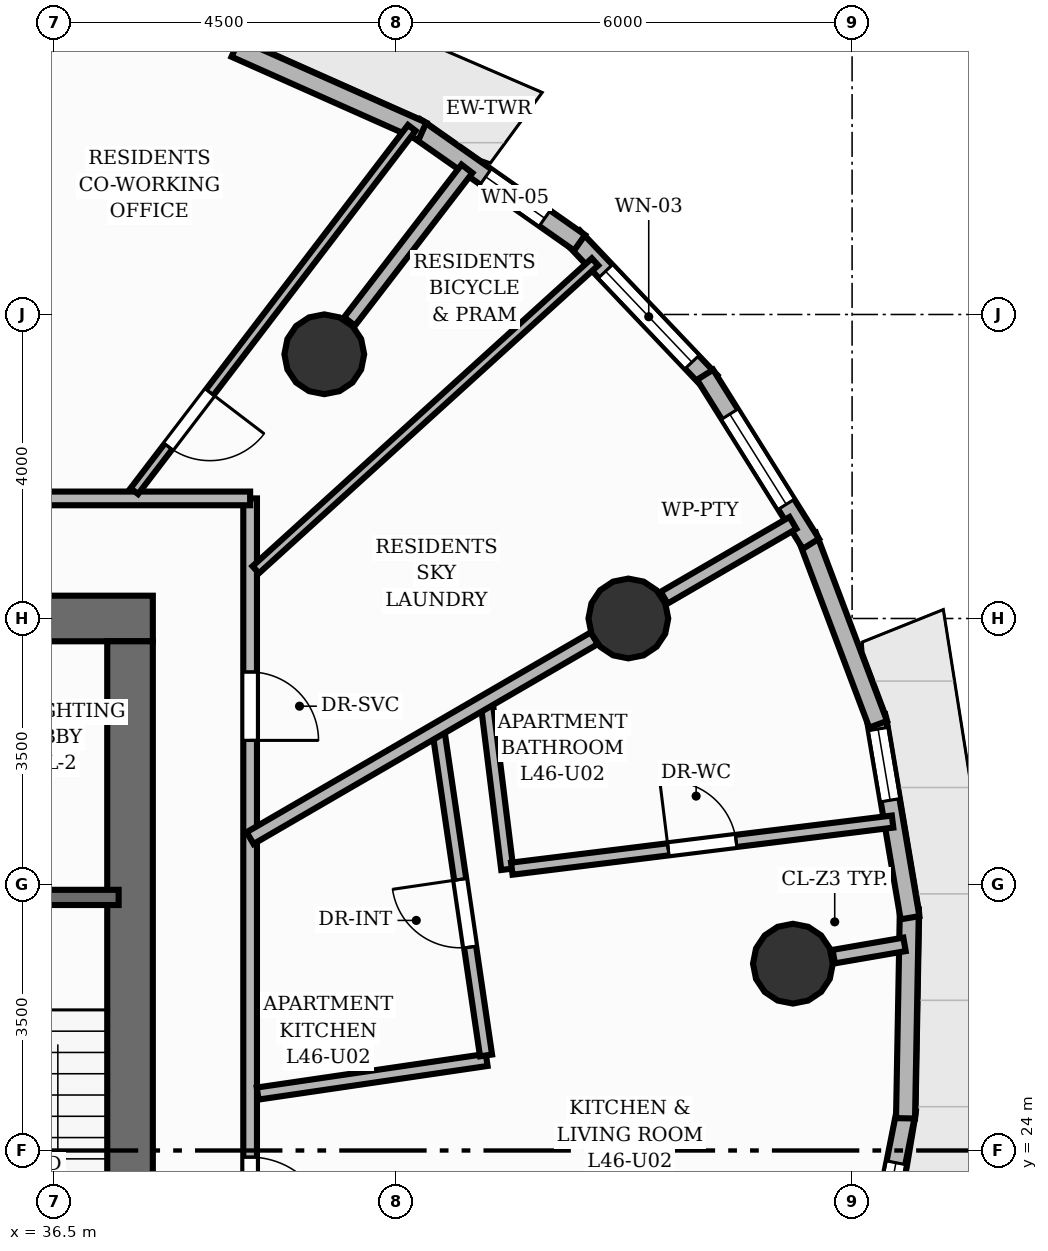
"""IFC4 building model, lengths in metres.
Left out: names, types, materials, properties, quantities, classifications, styles, units other than length and angle.
Written with IfcOpenShell. Run it as: python <this file> out.ifc"""

import sys

from ifc_helpers import new_model, si_unit, direction, frame, frame_2d, origin, origin_2d, place, context, subcontext, project, spatial, rectangle, circle, extrude, element, fill, save


model = new_model("IFC4")
c1 = context("Model", 3, precision=1e-05, world=origin(), true_north=direction((0.0, 1.0)))
c2 = subcontext(c1, "Body", "Model", "MODEL_VIEW")
j1 = project(units=[si_unit("LENGTHUNIT", "METRE"), si_unit("PLANEANGLEUNIT", "RADIAN")], contexts=[c1])
p1 = place(None, origin())
s1 = spatial("IfcSite", under=j1, at=p1, CompositionType="ELEMENT")
p2 = place(p1, origin())
s2 = spatial("IfcBuilding", under=s1, at=p2, CompositionType="ELEMENT")
p3 = place(p2, frame((0.0, 0.0, 155.36)))
s3 = spatial("IfcBuildingStorey", under=s2, at=p3, CompositionType="ELEMENT", Elevation=155.36)
p4 = place(p3, frame((22.7, 31.0, 0.0), z_axis=(0.0, 0.0, 1.0), x_axis=(1.0, 0.0, 0.0)))
e1 = element("IfcWall", 1, at=p4, inside=s3, PredefinedType="SHEAR", context=c2, shape_type="SweptSolid", body=[
    extrude(rectangle(XDim=15.1, YDim=0.6, at=frame_2d((7.55, 0.0))), origin(), (0.0, 0.0, 1.0), 3.2),
])
p5 = place(p4, frame((11.7, 0.0, 0.0)))
e2 = element("IfcOpeningElement", 2, at=p5, cuts=e1, PredefinedType="OPENING", context=c2, shape_type="SweptSolid", body=[
    extrude(rectangle(XDim=1.1, YDim=2.15, at=frame_2d((0.55, 1.075))), frame((0.0, 0.31, 0.0), z_axis=(0.0, -1.0, 0.0), x_axis=(1.0, 0.0, 0.0)), (0.0, 0.0, 1.0), 0.62),
])
p6 = place(p3, frame((37.5, 17.3, 0.0), z_axis=(0.0, 0.0, 1.0), x_axis=(0.0, 1.0, 0.0)))
e3 = element("IfcWall", 3, at=p6, inside=s3, PredefinedType="SHEAR", context=c2, shape_type="SweptSolid", body=[
    extrude(rectangle(XDim=13.4, YDim=0.6, at=frame_2d((6.7, 0.0))), origin(), (0.0, 0.0, 1.0), 3.2),
])
for number, where, z_axis, x_axis in (
    (4, (46.221, 26.458, 0.0), (0.0, 0.0, 1.0), (1.0, 0.0, 0.0)),
    (5, (44.056, 31.0, 0.0), (0.0, 0.0, 1.0), (1.0, 0.0, 0.0)),
    (6, (40.056, 34.477, 0.0), (0.0, 0.0, 1.0), (1.0, 0.0, 0.0)),
):
    element("IfcColumn", number, at=place(p3, frame(where, z_axis=z_axis, x_axis=x_axis)), inside=s3, PredefinedType="COLUMN", context=c2, shape_type="SweptSolid", body=[
        extrude(circle(Radius=0.525, at=origin_2d()), origin(), (0.0, 0.0, 1.0), 3.2),
    ])
p7 = place(p3, frame((43.328, 36.019, 0.0), z_axis=(0.0, 0.0, 1.0), x_axis=(0.688923042016, -0.724834492957, 0.0)))
e7 = element("IfcWall", 7, at=p7, inside=s3, PredefinedType="SOLIDWALL", context=c2, shape_type="SweptSolid", body=[
    extrude(rectangle(XDim=2.624, YDim=0.25, at=frame_2d((1.312, 0.0))), origin(), (0.0, 0.0, 1.0), 2.8),
])
p8 = place(p7, frame((0.621, 0.0, 0.85)))
e8 = element("IfcOpeningElement", 8, at=p8, cuts=e7, PredefinedType="OPENING", context=c2, shape_type="SweptSolid", body=[
    extrude(rectangle(XDim=1.65, YDim=1.55, at=frame_2d((0.825, 0.775))), frame((0.0, 0.135, 0.0), z_axis=(0.0, -1.0, 0.0), x_axis=(1.0, 0.0, 0.0)), (0.0, 0.0, 1.0), 0.27),
])
p9 = place(p3, frame((41.247, 37.466, 0.0), z_axis=(0.0, 0.0, 1.0), x_axis=(0.818434239786, -0.574600204617, 0.0)))
e9 = element("IfcWall", 9, at=p9, inside=s3, PredefinedType="SOLIDWALL", context=c2, shape_type="SweptSolid", body=[
    extrude(rectangle(XDim=2.648, YDim=0.25, at=frame_2d((1.324, 0.0))), origin(), (0.0, 0.0, 1.0), 2.8),
])
p10 = place(p9, frame((1.138, 0.0, 0.85)))
e10 = element("IfcOpeningElement", 10, at=p10, cuts=e9, PredefinedType="OPENING", context=c2, shape_type="SweptSolid", body=[
    extrude(rectangle(XDim=0.95, YDim=1.29, at=frame_2d((0.475, 0.645))), frame((0.0, 0.135, 0.0), z_axis=(0.0, -1.0, 0.0), x_axis=(1.0, 0.0, 0.0)), (0.0, 0.0, 1.0), 0.27),
])
p11 = place(p3, frame((38.886, 38.505, 0.0), z_axis=(0.0, 0.0, 1.0), x_axis=(0.913598321014, -0.406617889228, 0.0)))
e11 = element("IfcWall", 11, at=p11, inside=s3, PredefinedType="SOLIDWALL", context=c2, shape_type="SweptSolid", body=[
    extrude(rectangle(XDim=2.693, YDim=0.25, at=frame_2d((1.346, 0.0))), origin(), (0.0, 0.0, 1.0), 2.8),
])
p12 = place(p3, frame((47.715, 24.534, 0.0), z_axis=(0.0, 0.0, 1.0), x_axis=(-0.194099406303, -0.980981865517, 0.0)))
e12 = element("IfcWall", 12, at=p12, inside=s3, PredefinedType="SOLIDWALL", context=c2, shape_type="SweptSolid", body=[
    extrude(rectangle(XDim=2.817, YDim=0.25, at=frame_2d((1.409, 0.0))), origin(), (0.0, 0.0, 1.0), 2.8),
])
p13 = place(p12, frame((0.709, 0.0, 0.85)))
e13 = element("IfcOpeningElement", 13, at=p13, cuts=e12, PredefinedType="OPENING", context=c2, shape_type="SweptSolid", body=[
    extrude(rectangle(XDim=1.4, YDim=1.55, at=frame_2d((0.7, 0.775))), frame((0.0, 0.135, 0.0), z_axis=(0.0, -1.0, 0.0), x_axis=(1.0, 0.0, 0.0)), (0.0, 0.0, 1.0), 0.27),
])
p14 = place(p3, frame((47.753, 27.175, 0.0), z_axis=(0.0, 0.0, 1.0), x_axis=(-0.018273942119, -0.999833017578, 0.0)))
e14 = element("IfcWall", 14, at=p14, inside=s3, PredefinedType="SOLIDWALL", context=c2, shape_type="SweptSolid", body=[
    extrude(rectangle(XDim=2.752, YDim=0.25, at=frame_2d((1.376, 0.0))), origin(), (0.0, 0.0, 1.0), 2.8),
])
p15 = place(p3, frame((47.313, 29.718, 0.0), z_axis=(0.0, 0.0, 1.0), x_axis=(0.166721354457, -0.9860040517, 0.0)))
e15 = element("IfcWall", 15, at=p15, inside=s3, PredefinedType="SOLIDWALL", context=c2, shape_type="SweptSolid", body=[
    extrude(rectangle(XDim=2.693, YDim=0.25, at=frame_2d((1.346, 0.0))), origin(), (0.0, 0.0, 1.0), 2.8),
])
p16 = place(p15, frame((0.175, 0.0, 0.85)))
e16 = element("IfcOpeningElement", 16, at=p16, cuts=e15, PredefinedType="OPENING", context=c2, shape_type="SweptSolid", body=[
    extrude(rectangle(XDim=0.95, YDim=1.45, at=frame_2d((0.475, 0.725))), frame((0.0, 0.135, 0.0), z_axis=(0.0, -1.0, 0.0), x_axis=(1.0, 0.0, 0.0)), (0.0, 0.0, 1.0), 0.27),
])
p17 = place(p3, frame((46.408, 32.086, 0.0), z_axis=(0.0, 0.0, 1.0), x_axis=(0.353022229402, -0.93561493444, 0.0)))
e17 = element("IfcWall", 17, at=p17, inside=s3, PredefinedType="SOLIDWALL", context=c2, shape_type="SweptSolid", body=[
    extrude(rectangle(XDim=2.648, YDim=0.25, at=frame_2d((1.324, 0.0))), origin(), (0.0, 0.0, 1.0), 2.8),
])
p18 = place(p3, frame((45.066, 34.207, 0.0), z_axis=(0.0, 0.0, 1.0), x_axis=(0.530726374543, -0.847543223302, 0.0)))
e18 = element("IfcWall", 18, at=p18, inside=s3, PredefinedType="SOLIDWALL", context=c2, shape_type="SweptSolid", body=[
    extrude(rectangle(XDim=2.624, YDim=0.25, at=frame_2d((1.312, 0.0))), origin(), (0.0, 0.0, 1.0), 2.8),
])
p19 = place(p18, frame((0.612, 0.0, 0.85)))
e19 = element("IfcOpeningElement", 19, at=p19, cuts=e18, PredefinedType="OPENING", context=c2, shape_type="SweptSolid", body=[
    extrude(rectangle(XDim=1.4, YDim=1.29, at=frame_2d((0.7, 0.645))), frame((0.0, 0.135, 0.0), z_axis=(0.0, -1.0, 0.0), x_axis=(1.0, 0.0, 0.0)), (0.0, 0.0, 1.0), 0.27),
])
p20 = place(p3, frame((34.11, 27.33, 0.0), z_axis=(0.0, 0.0, 1.0), x_axis=(1.0, 0.0, 0.0)))
e20 = element("IfcWall", 20, at=p20, inside=s3, PredefinedType="SHEAR", context=c2, shape_type="SweptSolid", body=[
    extrude(rectangle(XDim=3.24, YDim=0.2, at=frame_2d((1.62, 0.0))), origin(), (0.0, 0.0, 1.0), 3.2),
])
p21 = place(p20, frame((1.135, 0.0, 0.0)))
e21 = element("IfcOpeningElement", 21, at=p21, cuts=e20, PredefinedType="OPENING", context=c2, shape_type="SweptSolid", body=[
    extrude(rectangle(XDim=1.05, YDim=2.15, at=frame_2d((0.525, 1.075))), frame((0.0, 0.11, 0.0), z_axis=(0.0, -1.0, 0.0), x_axis=(1.0, 0.0, 0.0)), (0.0, 0.0, 1.0), 0.22),
])
p22 = place(p3, frame((46.758, 26.551, 0.0), z_axis=(0.0, 0.0, 1.0), x_axis=(0.985363023372, 0.170469094476, 0.0)))
e22 = element("IfcWall", 22, at=p22, inside=s3, PredefinedType="PARTITIONING", context=c2, shape_type="SweptSolid", body=[
    extrude(rectangle(XDim=0.945, YDim=0.18, at=frame_2d((0.473, 0.0))), origin(), (0.0, 0.0, 1.0), 2.176),
])
p23 = place(p3, frame((44.528, 31.274, 0.0), z_axis=(0.0, 0.0, 1.0), x_axis=(0.864794183852, 0.502126497584, 0.0)))
e23 = element("IfcWall", 23, at=p23, inside=s3, PredefinedType="PARTITIONING", context=c2, shape_type="SweptSolid", body=[
    extrude(rectangle(XDim=1.959, YDim=0.18, at=frame_2d((0.979, 0.0))), origin(), (0.0, 0.0, 1.0), 2.176),
])
p24 = place(p3, frame((40.388, 34.908, 0.0), z_axis=(0.0, 0.0, 1.0), x_axis=(0.609529171404, 0.79276364019, 0.0)))
e24 = element("IfcWall", 24, at=p24, inside=s3, PredefinedType="PARTITIONING", context=c2, shape_type="SweptSolid", body=[
    extrude(rectangle(XDim=2.534, YDim=0.18, at=frame_2d((1.267, 0.0))), origin(), (0.0, 0.0, 1.0), 2.176),
])
p25 = place(p3, frame((39.08, 32.58, 0.0), z_axis=(0.0, 0.0, 1.0), x_axis=(0.0, -1.0, 0.0)))
e25 = element("IfcWall", 25, at=p25, inside=s3, PredefinedType="PARTITIONING", context=c2, shape_type="SweptSolid", body=[
    extrude(rectangle(XDim=17.16, YDim=0.18, at=frame_2d((8.58, 0.0))), origin(), (0.0, 0.0, 1.0), 2.795),
])
p26 = place(p25, frame((8.667, 0.0, 0.0)))
e26 = element("IfcOpeningElement", 26, at=p26, cuts=e25, PredefinedType="OPENING", context=c2, shape_type="SweptSolid", body=[
    extrude(rectangle(XDim=1.05, YDim=2.15, at=frame_2d((0.525, 1.075))), frame((0.0, 0.1, 0.0), z_axis=(0.0, -1.0, 0.0), x_axis=(1.0, 0.0, 0.0)), (0.0, 0.0, 1.0), 0.2),
])
p27 = place(p25, frame((2.284, 0.0, 0.0)))
e27 = element("IfcOpeningElement", 27, at=p27, cuts=e25, PredefinedType="OPENING", context=c2, shape_type="SweptSolid", body=[
    extrude(rectangle(XDim=0.9, YDim=2.1, at=frame_2d((0.45, 1.05))), frame((0.0, 0.1, 0.0), z_axis=(0.0, -1.0, 0.0), x_axis=(1.0, 0.0, 0.0)), (0.0, 0.0, 1.0), 0.2),
])
p28 = place(p3, frame((29.544, 32.58, 0.0), z_axis=(0.0, 0.0, 1.0), x_axis=(1.0, 0.0, 0.0)))
e28 = element("IfcWall", 28, at=p28, inside=s3, PredefinedType="PARTITIONING", context=c2, shape_type="SweptSolid", body=[
    extrude(rectangle(XDim=9.536, YDim=0.18, at=frame_2d((4.768, 0.0))), origin(), (0.0, 0.0, 1.0), 2.795),
])
p29 = place(p28, frame((5.733, 0.0, 0.0)))
e29 = element("IfcOpeningElement", 29, at=p29, cuts=e28, PredefinedType="OPENING", context=c2, shape_type="SweptSolid", body=[
    extrude(rectangle(XDim=0.9, YDim=2.1, at=frame_2d((0.45, 1.05))), frame((0.0, 0.1, 0.0), z_axis=(0.0, -1.0, 0.0), x_axis=(1.0, 0.0, 0.0)), (0.0, 0.0, 1.0), 0.2),
])
p30 = place(p3, frame((42.189, 29.916, 0.0), z_axis=(0.0, 0.0, 1.0), x_axis=(0.122809822633, -0.99243022297, 0.0)))
e30 = element("IfcWall", 30, at=p30, inside=s3, PredefinedType="PLUMBINGWALL", context=c2, shape_type="SweptSolid", body=[
    extrude(rectangle(XDim=2.232, YDim=0.16, at=frame_2d((1.116, 0.0))), origin(), (0.0, 0.0, 1.0), 2.795),
])
p31 = place(p3, frame((42.523, 27.708, 0.0), z_axis=(0.0, 0.0, 1.0), x_axis=(0.992432598709, 0.122790622685, 0.0)))
e31 = element("IfcWall", 31, at=p31, inside=s3, PredefinedType="PLUMBINGWALL", context=c2, shape_type="SweptSolid", body=[
    extrude(rectangle(XDim=5.048, YDim=0.16, at=frame_2d((2.524, 0.0))), origin(), (0.0, 0.0, 1.0), 2.532),
])
p32 = place(p31, frame((2.074, 0.0, 0.0)))
e32 = element("IfcOpeningElement", 32, at=p32, cuts=e31, PredefinedType="OPENING", context=c2, shape_type="SweptSolid", body=[
    extrude(rectangle(XDim=0.9, YDim=2.1, at=frame_2d((0.45, 1.05))), frame((0.0, 0.09, 0.0), z_axis=(0.0, -1.0, 0.0), x_axis=(1.0, 0.0, 0.0)), (0.0, 0.0, 1.0), 0.18),
])
p33 = place(p3, frame((39.179, 24.749, 0.0), z_axis=(0.0, 0.0, 1.0), x_axis=(0.989395416792, 0.145247062726, 0.0)))
e33 = element("IfcWall", 33, at=p33, inside=s3, PredefinedType="PLUMBINGWALL", context=c2, shape_type="SweptSolid", body=[
    extrude(rectangle(XDim=3.046, YDim=0.16, at=frame_2d((1.523, 0.0))), origin(), (0.0, 0.0, 1.0), 2.795),
])
p34 = place(p3, frame((42.184, 25.251, 0.0), z_axis=(0.0, 0.0, 1.0), x_axis=(-0.145293261483, 0.989388633535, 0.0)))
e34 = element("IfcWall", 34, at=p34, inside=s3, PredefinedType="PLUMBINGWALL", context=c2, shape_type="SweptSolid", body=[
    extrude(rectangle(XDim=4.342, YDim=0.16, at=frame_2d((2.171, 0.0))), origin(), (0.0, 0.0, 1.0), 2.795),
])
p35 = place(p34, frame((1.441, 0.0, 0.0)))
e35 = element("IfcOpeningElement", 35, at=p35, cuts=e34, PredefinedType="OPENING", context=c2, shape_type="SweptSolid", body=[
    extrude(rectangle(XDim=0.9, YDim=2.1, at=frame_2d((0.45, 1.05))), frame((0.0, 0.09, 0.0), z_axis=(0.0, -1.0, 0.0), x_axis=(1.0, 0.0, 0.0)), (0.0, 0.0, 1.0), 0.18),
])
p36 = place(p3, frame((39.08, 28.111, 0.0), z_axis=(0.0, 0.0, 1.0), x_axis=(0.864768049288, 0.502171505495, 0.0)))
e36 = element("IfcWall", 36, at=p36, inside=s3, PredefinedType="PARTITIONING", context=c2, shape_type="SweptSolid", body=[
    extrude(rectangle(XDim=5.237, YDim=0.18, at=frame_2d((2.619, 0.0))), origin(), (0.0, 0.0, 1.0), 2.176),
])
p37 = place(p3, frame((41.207, 37.455, 0.0), z_axis=(0.0, 0.0, 1.0), x_axis=(-0.606958821331, -0.794733281805, 0.0)))
e37 = element("IfcWall", 37, at=p37, inside=s3, PredefinedType="PARTITIONING", context=c2, shape_type="SweptSolid", body=[
    extrude(rectangle(XDim=6.015, YDim=0.125, at=frame_2d((3.007, 0.0))), origin(), (0.0, 0.0, 1.0), 2.795),
])
p38 = place(p37, frame((4.377, 0.0, 0.0)))
e38 = element("IfcOpeningElement", 38, at=p38, cuts=e37, PredefinedType="OPENING", context=c2, shape_type="SweptSolid", body=[
    extrude(rectangle(XDim=0.9, YDim=2.1, at=frame_2d((0.45, 1.05))), frame((0.0, 0.073, 0.0), z_axis=(0.0, -1.0, 0.0), x_axis=(1.0, 0.0, 0.0)), (0.0, 0.0, 1.0), 0.145),
])
p39 = place(p3, frame((39.154, 31.641, 0.0), z_axis=(0.0, 0.0, 1.0), x_axis=(0.740463996849, 0.672096026896, 0.0)))
e39 = element("IfcWall", 39, at=p39, inside=s3, PredefinedType="PARTITIONING", context=c2, shape_type="SweptSolid", body=[
    extrude(rectangle(XDim=6.028, YDim=0.125, at=frame_2d((3.014, 0.0))), origin(), (0.0, 0.0, 1.0), 2.795),
])
p40 = place(p8, origin())
e40 = element("IfcWindow", 40, at=p40, inside=s3, PartitioningType="SINGLE_PANEL", PredefinedType="WINDOW", context=c2, shape_type="SweptSolid", body=[
    extrude(rectangle(XDim=1.65, YDim=1.55, at=frame_2d((0.825, 0.775))), frame((0.0, 0.03, 0.0), z_axis=(0.0, -1.0, 0.0), x_axis=(1.0, 0.0, 0.0)), (0.0, 0.0, 1.0), 0.06),
])
fill(e8, e40)
p41 = place(p10, origin())
e41 = element("IfcWindow", 41, at=p41, inside=s3, PartitioningType="SINGLE_PANEL", PredefinedType="WINDOW", context=c2, shape_type="SweptSolid", body=[
    extrude(rectangle(XDim=0.95, YDim=1.29, at=frame_2d((0.475, 0.645))), frame((0.0, 0.03, 0.0), z_axis=(0.0, -1.0, 0.0), x_axis=(1.0, 0.0, 0.0)), (0.0, 0.0, 1.0), 0.06),
])
fill(e10, e41)
p42 = place(p13, origin())
e42 = element("IfcWindow", 42, at=p42, inside=s3, PartitioningType="SINGLE_PANEL", PredefinedType="WINDOW", context=c2, shape_type="SweptSolid", body=[
    extrude(rectangle(XDim=1.4, YDim=1.55, at=frame_2d((0.7, 0.775))), frame((0.0, 0.03, 0.0), z_axis=(0.0, -1.0, 0.0), x_axis=(1.0, 0.0, 0.0)), (0.0, 0.0, 1.0), 0.06),
])
fill(e13, e42)
p43 = place(p16, origin())
e43 = element("IfcWindow", 43, at=p43, inside=s3, PartitioningType="SINGLE_PANEL", PredefinedType="WINDOW", context=c2, shape_type="SweptSolid", body=[
    extrude(rectangle(XDim=0.95, YDim=1.45, at=frame_2d((0.475, 0.725))), frame((0.0, 0.03, 0.0), z_axis=(0.0, -1.0, 0.0), x_axis=(1.0, 0.0, 0.0)), (0.0, 0.0, 1.0), 0.06),
])
fill(e16, e43)
p44 = place(p19, origin())
e44 = element("IfcWindow", 44, at=p44, inside=s3, PartitioningType="SINGLE_PANEL", PredefinedType="WINDOW", context=c2, shape_type="SweptSolid", body=[
    extrude(rectangle(XDim=1.4, YDim=1.29, at=frame_2d((0.7, 0.645))), frame((0.0, 0.03, 0.0), z_axis=(0.0, -1.0, 0.0), x_axis=(1.0, 0.0, 0.0)), (0.0, 0.0, 1.0), 0.06),
])
fill(e19, e44)
p45 = place(p26, origin())
e45 = element("IfcDoor", 45, at=p45, inside=s3, OperationType="SINGLE_SWING_RIGHT", PredefinedType="DOOR", context=c2, shape_type="SweptSolid", body=[
    extrude(rectangle(XDim=1.05, YDim=2.15, at=frame_2d((0.525, 1.075))), frame((0.0, 0.025, 0.0), z_axis=(0.0, -1.0, 0.0), x_axis=(1.0, 0.0, 0.0)), (0.0, 0.0, 1.0), 0.05),
])
fill(e26, e45)
p46 = place(p32, origin())
e46 = element("IfcDoor", 46, at=p46, inside=s3, OperationType="SINGLE_SWING_LEFT", PredefinedType="DOOR", context=c2, shape_type="SweptSolid", body=[
    extrude(rectangle(XDim=0.9, YDim=2.1, at=frame_2d((0.45, 1.05))), frame((0.0, 0.025, 0.0), z_axis=(0.0, -1.0, 0.0), x_axis=(1.0, 0.0, 0.0)), (0.0, 0.0, 1.0), 0.05),
])
fill(e32, e46)
p47 = place(p35, origin())
e47 = element("IfcDoor", 47, at=p47, inside=s3, OperationType="SINGLE_SWING_RIGHT", PredefinedType="DOOR", context=c2, shape_type="SweptSolid", body=[
    extrude(rectangle(XDim=0.9, YDim=2.1, at=frame_2d((0.45, 1.05))), frame((0.0, 0.025, 0.0), z_axis=(0.0, -1.0, 0.0), x_axis=(1.0, 0.0, 0.0)), (0.0, 0.0, 1.0), 0.05),
])
fill(e35, e47)
p48 = place(p27, origin())
e48 = element("IfcDoor", 48, at=p48, inside=s3, OperationType="SINGLE_SWING_RIGHT", PredefinedType="DOOR", context=c2, shape_type="SweptSolid", body=[
    extrude(rectangle(XDim=0.9, YDim=2.1, at=frame_2d((0.45, 1.05))), frame((0.0, 0.025, 0.0), z_axis=(0.0, -1.0, 0.0), x_axis=(1.0, 0.0, 0.0)), (0.0, 0.0, 1.0), 0.05),
])
fill(e27, e48)
p49 = place(p38, origin())
e49 = element("IfcDoor", 49, at=p49, inside=s3, OperationType="SINGLE_SWING_LEFT", PredefinedType="DOOR", context=c2, shape_type="SweptSolid", body=[
    extrude(rectangle(XDim=0.9, YDim=2.1, at=frame_2d((0.45, 1.05))), frame((0.0, 0.025, 0.0), z_axis=(0.0, -1.0, 0.0), x_axis=(1.0, 0.0, 0.0)), (0.0, 0.0, 1.0), 0.05),
])
fill(e38, e49)
save(model, sys.argv[1])
